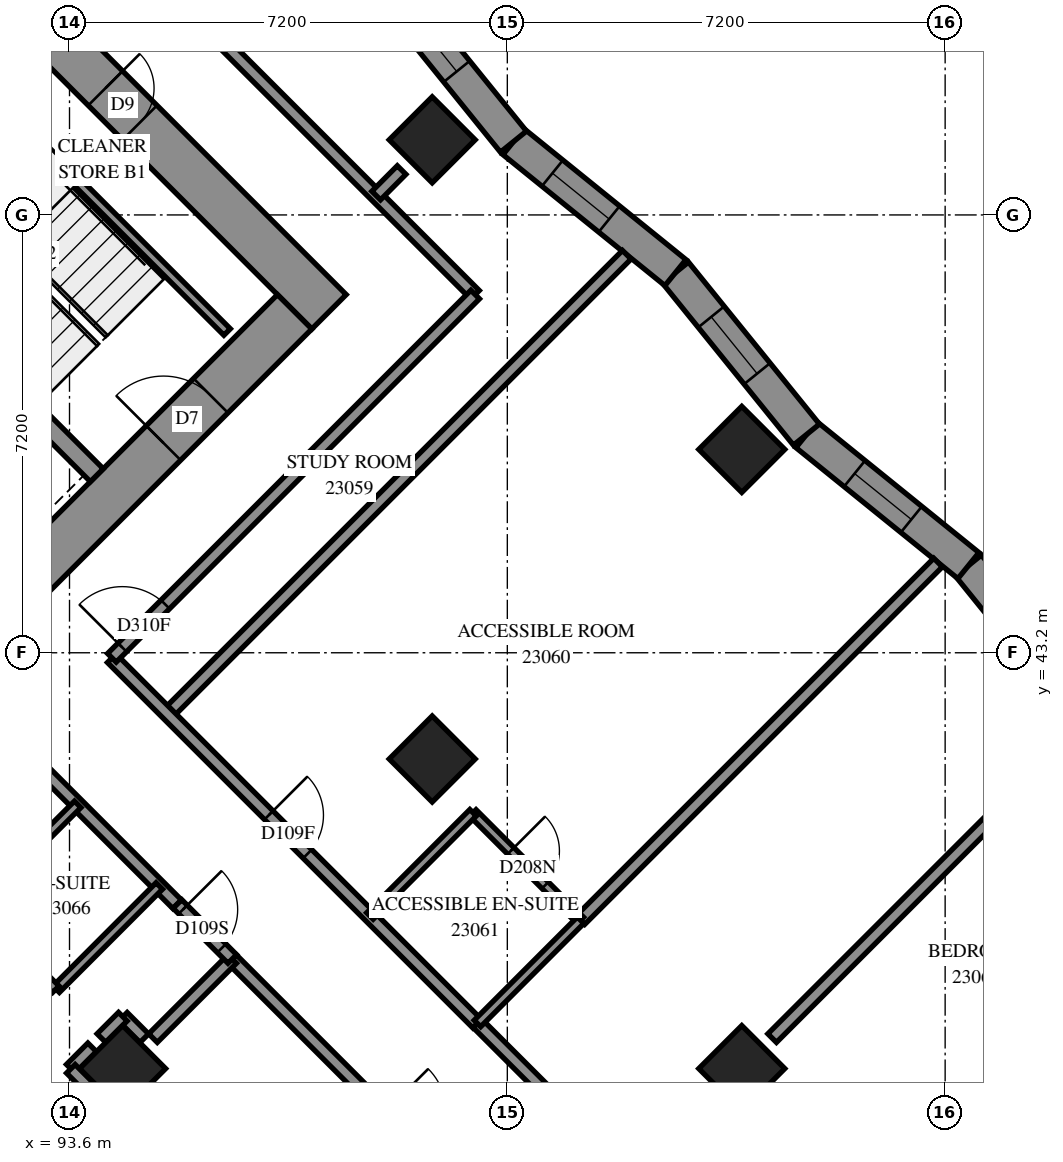
"""IFC4 building model, lengths in metres.
Left out: names, types, materials, properties, quantities, classifications, styles, units other than length and angle.
Written with IfcOpenShell. Run it as: python <this file> out.ifc"""

import sys

from ifc_helpers import new_model, si_unit, direction, frame, frame_2d, origin, origin_2d, place, context, subcontext, project, spatial, polyline, rectangle, outline, extrude, element, fill, save


model = new_model("IFC4")
c1 = context("Model", 3, precision=1e-05, world=origin(), true_north=direction((0.0, 1.0)))
c2 = subcontext(c1, "Body", "Model", "MODEL_VIEW")
j1 = project(units=[si_unit("LENGTHUNIT", "METRE"), si_unit("PLANEANGLEUNIT", "RADIAN")], contexts=[c1])
p1 = place(None, origin())
s1 = spatial("IfcSite", under=j1, at=p1, CompositionType="ELEMENT")
p2 = place(p1, origin())
s2 = spatial("IfcBuilding", under=s1, at=p2, CompositionType="ELEMENT")
p3 = place(p2, frame((0.0, 0.0, 88.0)))
s3 = spatial("IfcBuildingStorey", under=s2, at=p3, CompositionType="ELEMENT", Elevation=88.0)
for number, where, z_axis, x_axis in (
    (1, (99.565, 51.635, 0.0), (0.0, 0.0, 1.0), (0.707, -0.707, 0.0)),
    (2, (104.656, 46.544, 0.0), (0.0, 0.0, 1.0), (0.707, -0.707, 0.0)),
    (3, (99.565, 41.453, 0.0), (0.0, 0.0, 1.0), (0.707, -0.707, 0.0)),
    (4, (94.474, 36.362, 0.0), (0.0, 0.0, 1.0), (0.707, -0.707, 0.0)),
    (5, (104.656, 36.362, 0.0), (0.0, 0.0, 1.0), (0.707, -0.707, 0.0)),
):
    element("IfcColumn", number, at=place(p3, frame(where, z_axis=z_axis, x_axis=x_axis)), inside=s3, PredefinedType="COLUMN", context=c2, shape_type="SweptSolid", body=[
        extrude(rectangle(XDim=1.0, YDim=1.0, at=origin_2d()), origin(), (0.0, 0.0, 1.0), 3.1),
    ])
p4 = place(p3, frame((86.554, 60.121, -0.3), z_axis=(0.0, 0.0, 1.0), x_axis=(0.7071067812, -0.7071067812, 0.0)))
e6 = element("IfcWall", 6, at=p4, inside=s3, PredefinedType="SHEAR", context=c2, shape_type="SweptSolid", body=[
    extrude(rectangle(XDim=16.0, YDim=0.8, at=frame_2d((8.0, 0.0))), origin(), (0.0, 0.0, 1.0), 2.7),
])
p5 = place(p4, frame((10.8, 0.0, 0.3)))
e7 = element("IfcOpeningElement", 7, at=p5, cuts=e6, PredefinedType="OPENING", context=c2, shape_type="SweptSolid", body=[
    extrude(rectangle(XDim=0.8, YDim=2.1, at=frame_2d((0.4, 1.05))), frame((0.0, 0.41, 0.0), z_axis=(0.0, -1.0, 0.0), x_axis=(1.0, 0.0, 0.0)), (0.0, 0.0, 1.0), 0.82),
])
p6 = place(p3, frame((87.12, 38.625, -0.3), z_axis=(0.0, 0.0, 1.0), x_axis=(0.7071067812, 0.7071067812, 0.0)))
e8 = element("IfcWall", 8, at=p6, inside=s3, PredefinedType="SHEAR", context=c2, shape_type="SweptSolid", body=[
    extrude(rectangle(XDim=14.4, YDim=0.8, at=frame_2d((7.2, 0.0))), origin(), (0.0, 0.0, 1.0), 2.7),
])
p7 = place(p6, frame((4.55, 0.0, 0.3)))
e9 = element("IfcOpeningElement", 9, at=p7, cuts=e8, PredefinedType="OPENING", context=c2, shape_type="SweptSolid", body=[
    extrude(rectangle(XDim=1.1, YDim=2.1, at=frame_2d((0.55, 1.05))), frame((0.0, 0.41, 0.0), z_axis=(0.0, -1.0, 0.0), x_axis=(1.0, 0.0, 0.0)), (0.0, 0.0, 1.0), 0.82),
])
p8 = place(p6, frame((11.35, 0.0, 0.3)))
e10 = element("IfcOpeningElement", 10, at=p8, cuts=e8, PredefinedType="OPENING", context=c2, shape_type="SweptSolid", body=[
    extrude(rectangle(XDim=1.1, YDim=2.1, at=frame_2d((0.55, 1.05))), frame((0.0, 0.41, 0.0), z_axis=(0.0, -1.0, 0.0), x_axis=(1.0, 0.0, 0.0)), (0.0, 0.0, 1.0), 0.82),
])
p9 = place(p3, frame((88.958, 51.211, 0.0), z_axis=(0.0, 0.0, 1.0), x_axis=(0.7070998367, -0.7071137256, 0.0)))
e11 = element("IfcWall", 11, at=p9, inside=s3, PredefinedType="SOLIDWALL", context=c2, shape_type="SweptSolid", body=[
    extrude(rectangle(XDim=7.2, YDim=0.3, at=frame_2d((3.6, 0.0))), origin(), (0.0, 0.0, 1.0), 3.1),
])
p10 = place(p3, frame((110.552, 41.951, 0.0), z_axis=(0.0, 0.0, 1.0), x_axis=(-0.6286568792, 0.7776827941, 0.0)))
e12 = element("IfcWall", 12, at=p10, inside=s3, PredefinedType="SOLIDWALL", context=c2, shape_type="SweptSolid", body=[
    extrude(outline(polyline([(0.053, -0.275), (3.479, -0.275), (3.421, 0.275), (-0.053, 0.275), (0.053, -0.275)])), origin(), (0.0, 0.0, 1.0), 3.1),
])
p11 = place(p10, frame((1.11, 0.0, 0.5)))
e13 = element("IfcOpeningElement", 13, at=p11, cuts=e12, PredefinedType="OPENING", context=c2, shape_type="SweptSolid", body=[
    extrude(rectangle(XDim=1.2, YDim=2.45, at=frame_2d((0.6, 1.225))), frame((0.0, 0.285, 0.0), z_axis=(0.0, -1.0, 0.0), x_axis=(1.0, 0.0, 0.0)), (0.0, 0.0, 1.0), 0.57),
])
p12 = place(p3, frame((108.383, 44.634, 0.0), z_axis=(0.0, 0.0, 1.0), x_axis=(-0.777677697, 0.6286631845, 0.0)))
e14 = element("IfcWall", 14, at=p12, inside=s3, PredefinedType="SOLIDWALL", context=c2, shape_type="SweptSolid", body=[
    extrude(outline(polyline([(-0.029, -0.275), (3.397, -0.275), (3.455, 0.275), (0.029, 0.275), (-0.029, -0.275)])), origin(), (0.0, 0.0, 1.0), 3.1),
])
p13 = place(p12, frame((1.207, 0.0, 0.5)))
e15 = element("IfcOpeningElement", 15, at=p13, cuts=e14, PredefinedType="OPENING", context=c2, shape_type="SweptSolid", body=[
    extrude(rectangle(XDim=1.2, YDim=2.45, at=frame_2d((0.6, 1.225))), frame((0.0, 0.285, 0.0), z_axis=(0.0, -1.0, 0.0), x_axis=(1.0, 0.0, 0.0)), (0.0, 0.0, 1.0), 0.57),
])
p14 = place(p3, frame((105.719, 46.787, 0.0), z_axis=(0.0, 0.0, 1.0), x_axis=(-0.6286631845, 0.777677697, 0.0)))
e16 = element("IfcWall", 16, at=p14, inside=s3, PredefinedType="SOLIDWALL", context=c2, shape_type="SweptSolid", body=[
    extrude(outline(polyline([(0.029, -0.275), (3.455, -0.275), (3.397, 0.275), (-0.029, 0.275), (0.029, -0.275)])), origin(), (0.0, 0.0, 1.0), 3.1),
])
p15 = place(p14, frame((1.29, 0.0, 0.5)))
e17 = element("IfcOpeningElement", 17, at=p15, cuts=e16, PredefinedType="OPENING", context=c2, shape_type="SweptSolid", body=[
    extrude(rectangle(XDim=1.2, YDim=2.45, at=frame_2d((0.6, 1.225))), frame((0.0, 0.285, 0.0), z_axis=(0.0, -1.0, 0.0), x_axis=(1.0, 0.0, 0.0)), (0.0, 0.0, 1.0), 0.57),
])
p16 = place(p3, frame((103.565, 49.452, 0.0), z_axis=(0.0, 0.0, 1.0), x_axis=(-0.777689233, 0.6286489138, 0.0)))
e18 = element("IfcWall", 18, at=p16, inside=s3, PredefinedType="SOLIDWALL", context=c2, shape_type="SweptSolid", body=[
    extrude(outline(polyline([(-0.029, -0.275), (3.397, -0.275), (3.455, 0.275), (0.029, 0.275), (-0.029, -0.275)])), origin(), (0.0, 0.0, 1.0), 3.1),
])
p17 = place(p16, frame((1.401, 0.0, 0.5)))
e19 = element("IfcOpeningElement", 19, at=p17, cuts=e18, PredefinedType="OPENING", context=c2, shape_type="SweptSolid", body=[
    extrude(rectangle(XDim=1.2, YDim=2.45, at=frame_2d((0.6, 1.225))), frame((0.0, 0.285, 0.0), z_axis=(0.0, -1.0, 0.0), x_axis=(1.0, 0.0, 0.0)), (0.0, 0.0, 1.0), 0.57),
])
p18 = place(p3, frame((100.901, 51.605, 0.0), z_axis=(0.0, 0.0, 1.0), x_axis=(-0.6286631845, 0.777677697, 0.0)))
e20 = element("IfcWall", 20, at=p18, inside=s3, PredefinedType="SOLIDWALL", context=c2, shape_type="SweptSolid", body=[
    extrude(outline(polyline([(0.029, -0.275), (3.455, -0.275), (3.397, 0.275), (-0.029, 0.275), (0.029, -0.275)])), origin(), (0.0, 0.0, 1.0), 3.1),
])
p19 = place(p18, frame((1.484, 0.0, 0.5)))
e21 = element("IfcOpeningElement", 21, at=p19, cuts=e20, PredefinedType="OPENING", context=c2, shape_type="SweptSolid", body=[
    extrude(rectangle(XDim=1.2, YDim=2.45, at=frame_2d((0.6, 1.225))), frame((0.0, 0.285, 0.0), z_axis=(0.0, -1.0, 0.0), x_axis=(1.0, 0.0, 0.0)), (0.0, 0.0, 1.0), 0.57),
])
p20 = place(p3, frame((91.313, 53.354, 0.0), z_axis=(0.0, 0.0, 1.0), x_axis=(0.7071140275, -0.7070995348, 0.0)))
e22 = element("IfcWall", 22, at=p20, inside=s3, PredefinedType="PARTITIONING", context=c2, shape_type="SweptSolid", body=[
    extrude(rectangle(XDim=6.9, YDim=0.15, at=frame_2d((3.45, 0.0))), origin(), (0.0, 0.0, 1.0), 3.1),
])
p21 = place(p3, frame((87.894, 61.461, 0.0), z_axis=(0.0, 0.0, 1.0), x_axis=(0.7071067812, -0.7071067812, 0.0)))
e23 = element("IfcWall", 23, at=p21, inside=s3, PredefinedType="PARTITIONING", context=c2, shape_type="SweptSolid", body=[
    extrude(rectangle(XDim=17.5, YDim=0.2, at=frame_2d((8.75, 0.0))), origin(), (0.0, 0.0, 1.0), 3.1),
])
p22 = place(p21, frame((8.735, 0.0, 0.0)))
e24 = element("IfcOpeningElement", 24, at=p22, cuts=e23, PredefinedType="OPENING", context=c2, shape_type="SweptSolid", body=[
    extrude(rectangle(XDim=0.9, YDim=2.1, at=frame_2d((0.45, 1.05))), frame((0.0, 0.11, 0.0), z_axis=(0.0, -1.0, 0.0), x_axis=(1.0, 0.0, 0.0)), (0.0, 0.0, 1.0), 0.22),
])
p23 = place(p3, frame((95.215, 42.197, 0.0), z_axis=(0.0, 0.0, 1.0), x_axis=(0.7071067812, 0.7071067812, 0.0)))
e25 = element("IfcWall", 25, at=p23, inside=s3, PredefinedType="PARTITIONING", context=c2, shape_type="SweptSolid", body=[
    extrude(rectangle(XDim=10.675, YDim=0.2, at=frame_2d((5.338, 0.0))), origin(), (0.0, 0.0, 1.0), 3.1),
])
p24 = place(p3, frame((94.294, 43.111, 0.0), z_axis=(0.0, 0.0, 1.0), x_axis=(0.7071067812, -0.7071067812, 0.0)))
e26 = element("IfcWall", 26, at=p24, inside=s3, PredefinedType="PARTITIONING", context=c2, shape_type="SweptSolid", body=[
    extrude(rectangle(XDim=8.499, YDim=0.2, at=frame_2d((4.25, 0.0))), origin(), (0.0, 0.0, 1.0), 3.1),
])
p25 = place(p24, frame((3.651, 0.0, 0.0)))
e27 = element("IfcOpeningElement", 27, at=p25, cuts=e26, PredefinedType="OPENING", context=c2, shape_type="SweptSolid", body=[
    extrude(rectangle(XDim=0.9, YDim=2.1, at=frame_2d((0.45, 1.05))), frame((0.0, 0.11, 0.0), z_axis=(0.0, -1.0, 0.0), x_axis=(1.0, 0.0, 0.0)), (0.0, 0.0, 1.0), 0.22),
])
p26 = place(p3, frame((94.297, 43.117, 0.0), z_axis=(0.0, 0.0, 1.0), x_axis=(0.7071067812, 0.7071067812, 0.0)))
e28 = element("IfcWall", 28, at=p26, inside=s3, PredefinedType="PARTITIONING", context=c2, shape_type="SweptSolid", body=[
    extrude(rectangle(XDim=8.448, YDim=0.2, at=frame_2d((4.224, 0.0))), origin(), (0.0, 0.0, 1.0), 3.1),
])
p27 = place(p26, frame((0.242, 0.0, 0.0)))
e29 = element("IfcOpeningElement", 29, at=p27, cuts=e28, PredefinedType="OPENING", context=c2, shape_type="SweptSolid", body=[
    extrude(rectangle(XDim=1.0, YDim=2.1, at=frame_2d((0.5, 1.05))), frame((0.0, 0.11, 0.0), z_axis=(0.0, -1.0, 0.0), x_axis=(1.0, 0.0, 0.0)), (0.0, 0.0, 1.0), 0.22),
])
p28 = place(p3, frame((102.002, 38.804, 0.0), z_axis=(0.0, 0.0, 1.0), x_axis=(0.7072390372, 0.7069745004, 0.0)))
e30 = element("IfcWall", 30, at=p28, inside=s3, PredefinedType="PARTITIONING", context=c2, shape_type="SweptSolid", body=[
    extrude(rectangle(XDim=8.316, YDim=0.2, at=frame_2d((4.158, 0.0))), origin(), (0.0, 0.0, 1.0), 3.1),
])
p29 = place(p3, frame((105.155, 36.863, 0.0), z_axis=(0.0, 0.0, 1.0), x_axis=(0.7071067812, 0.7071067812, 0.0)))
e31 = element("IfcWall", 31, at=p29, inside=s3, PredefinedType="PARTITIONING", context=c2, shape_type="SweptSolid", body=[
    extrude(rectangle(XDim=5.787, YDim=0.2, at=frame_2d((2.893, 0.0))), origin(), (0.0, 0.0, 1.0), 3.1),
])
p30 = place(p3, frame((92.809, 41.627, 0.0), z_axis=(0.0, 0.0, 1.0), x_axis=(0.7071067812, -0.7071067812, 0.0)))
e32 = element("IfcWall", 32, at=p30, inside=s3, PredefinedType="PARTITIONING", context=c2, shape_type="SweptSolid", body=[
    extrude(rectangle(XDim=3.623, YDim=0.2, at=frame_2d((1.812, 0.0))), origin(), (0.0, 0.0, 1.0), 3.1),
])
p31 = place(p3, frame((100.31, 37.106, 0.0), z_axis=(0.0, 0.0, 1.0), x_axis=(0.7073845681, -0.7068288851, 0.0)))
e33 = element("IfcWall", 33, at=p31, inside=s3, PredefinedType="PARTITIONING", context=c2, shape_type="SweptSolid", body=[
    extrude(rectangle(XDim=3.599, YDim=0.2, at=frame_2d((1.8, 0.0))), origin(), (0.0, 0.0, 1.0), 3.1),
])
p32 = place(p3, frame((96.274, 38.162, 0.0), z_axis=(0.0, 0.0, 1.0), x_axis=(0.7071067812, -0.7071067812, 0.0)))
e34 = element("IfcWall", 34, at=p32, inside=s3, PredefinedType="PARTITIONING", context=c2, shape_type="SweptSolid", body=[
    extrude(rectangle(XDim=3.1, YDim=0.2, at=frame_2d((1.55, 0.0))), origin(), (0.0, 0.0, 1.0), 3.1),
])
p33 = place(p3, frame((100.233, 40.567, 0.0), z_axis=(0.0, 0.0, 1.0), x_axis=(0.7071067812, -0.7071067812, 0.0)))
e35 = element("IfcWall", 35, at=p33, inside=s3, PredefinedType="PARTITIONING", context=c2, shape_type="SweptSolid", body=[
    extrude(rectangle(XDim=2.5, YDim=0.15, at=frame_2d((1.25, 0.0))), origin(), (0.0, 0.0, 1.0), 3.1),
])
p34 = place(p33, frame((0.883, 0.0, 0.0)))
e36 = element("IfcOpeningElement", 36, at=p34, cuts=e35, PredefinedType="OPENING", context=c2, shape_type="SweptSolid", body=[
    extrude(rectangle(XDim=0.8, YDim=2.1, at=frame_2d((0.4, 1.05))), frame((0.0, 0.085, 0.0), z_axis=(0.0, -1.0, 0.0), x_axis=(1.0, 0.0, 0.0)), (0.0, 0.0, 1.0), 0.17),
])
for number, where, z_axis, x_axis in (
    (37, (92.037, 39.011, 0.0), (0.0, 0.0, 1.0), (0.708, 0.707, 0.0)),
    (38, (93.381, 37.667, 0.0), (0.0, 0.0, 1.0), (0.707, 0.708, 0.0)),
    (39, (98.541, 38.871, 0.0), (0.0, 0.0, 1.0), (0.707, 0.708, 0.0)),
    (40, (100.308, 37.103, 0.0), (0.0, 0.0, 1.0), (0.707, 0.708, 0.0)),
):
    element("IfcWall", number, at=place(p3, frame(where, z_axis=z_axis, x_axis=x_axis)), inside=s3, PredefinedType="PARTITIONING", context=c2, shape_type="SweptSolid", body=[
        extrude(rectangle(XDim=2.4, YDim=0.15, at=frame_2d((1.2, 0.0))), origin(), (0.0, 0.0, 1.0), 3.1),
    ])
p35 = place(p3, frame((92.031, 39.011, 0.0), z_axis=(0.0, 0.0, 1.0), x_axis=(0.7071067812, -0.7071067812, 0.0)))
e41 = element("IfcWall", 41, at=p35, inside=s3, PredefinedType="PARTITIONING", context=c2, shape_type="SweptSolid", body=[
    extrude(rectangle(XDim=1.901, YDim=0.15, at=frame_2d((0.95, 0.0))), origin(), (0.0, 0.0, 1.0), 3.1),
])
p36 = place(p35, frame((0.502, 0.0, 0.0)))
e42 = element("IfcOpeningElement", 42, at=p36, cuts=e41, PredefinedType="OPENING", context=c2, shape_type="SweptSolid", body=[
    extrude(rectangle(XDim=0.8, YDim=2.1, at=frame_2d((0.4, 1.05))), frame((0.0, 0.085, 0.0), z_axis=(0.0, -1.0, 0.0), x_axis=(1.0, 0.0, 0.0)), (0.0, 0.0, 1.0), 0.17),
])
p37 = place(p3, frame((94.973, 36.863, 0.0), z_axis=(0.0, 0.0, 1.0), x_axis=(0.7071067812, 0.7071067812, 0.0)))
e43 = element("IfcWall", 43, at=p37, inside=s3, PredefinedType="PARTITIONING", context=c2, shape_type="SweptSolid", body=[
    extrude(rectangle(XDim=1.841, YDim=0.2, at=frame_2d((0.921, 0.0))), origin(), (0.0, 0.0, 1.0), 3.1),
])
p38 = place(p3, frame((95.375, 39.069, 0.0), z_axis=(0.0, 0.0, 1.0), x_axis=(0.7063232841, -0.7078894111, 0.0)))
e44 = element("IfcWall", 44, at=p38, inside=s3, PredefinedType="PARTITIONING", context=c2, shape_type="SweptSolid", body=[
    extrude(rectangle(XDim=1.277, YDim=0.2, at=frame_2d((0.638, 0.0))), origin(), (0.0, 0.0, 1.0), 3.1),
])
p39 = place(p38, frame((0.129, 0.0, 0.0)))
e45 = element("IfcOpeningElement", 45, at=p39, cuts=e44, PredefinedType="OPENING", context=c2, shape_type="SweptSolid", body=[
    extrude(rectangle(XDim=0.9, YDim=2.1, at=frame_2d((0.45, 1.05))), frame((0.0, 0.11, 0.0), z_axis=(0.0, -1.0, 0.0), x_axis=(1.0, 0.0, 0.0)), (0.0, 0.0, 1.0), 0.22),
])
p40 = place(p3, frame((98.644, 50.718, 0.0), z_axis=(0.0, 0.0, 1.0), x_axis=(0.7054171665, 0.7087923682, 0.0)))
e46 = element("IfcWall", 46, at=p40, inside=s3, PredefinedType="PARTITIONING", context=c2, shape_type="SweptSolid", body=[
    extrude(rectangle(XDim=0.593, YDim=0.2, at=frame_2d((0.296, 0.0))), origin(), (0.0, 0.0, 1.0), 3.1),
])
for number, where, z_axis, x_axis in (
    (47, (93.621, 36.359, 0.0), (0.0, 0.0, 1.0), (0.707, 0.707, 0.0)),
    (48, (94.478, 37.214, 0.0), (0.0, 0.0, 1.0), (0.707, -0.707, 0.0)),
    (49, (94.125, 36.863, 0.0), (0.0, 0.0, 1.0), (0.707, 0.707, 0.0)),
    (50, (93.622, 36.358, 0.0), (0.0, 0.0, 1.0), (0.707, -0.707, 0.0)),
):
    element("IfcWall", number, at=place(p3, frame(where, z_axis=z_axis, x_axis=x_axis)), inside=s3, PredefinedType="PARTITIONING", context=c2, shape_type="SweptSolid", body=[
        extrude(rectangle(XDim=0.498, YDim=0.2, at=frame_2d((0.249, 0.0))), origin(), (0.0, 0.0, 1.0), 3.1),
    ])
p41 = place(p13, origin())
e51 = element("IfcWindow", 51, at=p41, inside=s3, PartitioningType="SINGLE_PANEL", PredefinedType="WINDOW", context=c2, shape_type="SweptSolid", body=[
    extrude(rectangle(XDim=1.2, YDim=2.45, at=frame_2d((0.6, 1.225))), frame((0.0, 0.155, 0.0), z_axis=(0.0, -1.0, 0.0), x_axis=(1.0, 0.0, 0.0)), (0.0, 0.0, 1.0), 0.06),
])
fill(e15, e51)
p42 = place(p15, origin())
e52 = element("IfcWindow", 52, at=p42, inside=s3, PartitioningType="SINGLE_PANEL", PredefinedType="WINDOW", context=c2, shape_type="SweptSolid", body=[
    extrude(rectangle(XDim=1.2, YDim=2.45, at=frame_2d((0.6, 1.225))), frame((0.0, 0.155, 0.0), z_axis=(0.0, -1.0, 0.0), x_axis=(1.0, 0.0, 0.0)), (0.0, 0.0, 1.0), 0.06),
])
fill(e17, e52)
p43 = place(p17, origin())
e53 = element("IfcWindow", 53, at=p43, inside=s3, PartitioningType="SINGLE_PANEL", PredefinedType="WINDOW", context=c2, shape_type="SweptSolid", body=[
    extrude(rectangle(XDim=1.2, YDim=2.45, at=frame_2d((0.6, 1.225))), frame((0.0, 0.155, 0.0), z_axis=(0.0, -1.0, 0.0), x_axis=(1.0, 0.0, 0.0)), (0.0, 0.0, 1.0), 0.06),
])
fill(e19, e53)
p44 = place(p19, origin())
e54 = element("IfcWindow", 54, at=p44, inside=s3, PartitioningType="SINGLE_PANEL", PredefinedType="WINDOW", context=c2, shape_type="SweptSolid", body=[
    extrude(rectangle(XDim=1.2, YDim=2.45, at=frame_2d((0.6, 1.225))), frame((0.0, 0.155, 0.0), z_axis=(0.0, -1.0, 0.0), x_axis=(1.0, 0.0, 0.0)), (0.0, 0.0, 1.0), 0.06),
])
fill(e21, e54)
p45 = place(p5, origin())
e55 = element("IfcDoor", 55, at=p45, inside=s3, OperationType="SINGLE_SWING_RIGHT", PredefinedType="DOOR", context=c2, shape_type="SweptSolid", body=[
    extrude(rectangle(XDim=0.8, YDim=2.1, at=frame_2d((0.4, 1.05))), frame((0.0, -0.34, 0.0), z_axis=(0.0, -1.0, 0.0), x_axis=(1.0, 0.0, 0.0)), (0.0, 0.0, 1.0), 0.05),
])
fill(e7, e55)
p46 = place(p8, origin())
e56 = element("IfcDoor", 56, at=p46, inside=s3, OperationType="SINGLE_SWING_RIGHT", PredefinedType="DOOR", context=c2, shape_type="SweptSolid", body=[
    extrude(rectangle(XDim=1.1, YDim=2.1, at=frame_2d((0.55, 1.05))), frame((0.0, 0.025, 0.0), z_axis=(0.0, -1.0, 0.0), x_axis=(1.0, 0.0, 0.0)), (0.0, 0.0, 1.0), 0.05),
])
fill(e10, e56)
p47 = place(p27, origin())
e57 = element("IfcDoor", 57, at=p47, inside=s3, OperationType="SINGLE_SWING_LEFT", PredefinedType="DOOR", context=c2, shape_type="SweptSolid", body=[
    extrude(rectangle(XDim=1.0, YDim=2.1, at=frame_2d((0.5, 1.05))), frame((0.0, 0.025, 0.0), z_axis=(0.0, -1.0, 0.0), x_axis=(1.0, 0.0, 0.0)), (0.0, 0.0, 1.0), 0.05),
])
fill(e29, e57)
p48 = place(p25, origin())
e58 = element("IfcDoor", 58, at=p48, inside=s3, OperationType="SINGLE_SWING_RIGHT", PredefinedType="DOOR", context=c2, shape_type="SweptSolid", body=[
    extrude(rectangle(XDim=0.9, YDim=2.1, at=frame_2d((0.45, 1.05))), frame((0.0, 0.025, 0.0), z_axis=(0.0, -1.0, 0.0), x_axis=(1.0, 0.0, 0.0)), (0.0, 0.0, 1.0), 0.05),
])
fill(e27, e58)
p49 = place(p34, origin())
e59 = element("IfcDoor", 59, at=p49, inside=s3, OperationType="SINGLE_SWING_RIGHT", PredefinedType="DOOR", context=c2, shape_type="SweptSolid", body=[
    extrude(rectangle(XDim=0.8, YDim=2.1, at=frame_2d((0.4, 1.05))), frame((0.0, 0.025, 0.0), z_axis=(0.0, -1.0, 0.0), x_axis=(1.0, 0.0, 0.0)), (0.0, 0.0, 1.0), 0.05),
])
fill(e36, e59)
p50 = place(p39, origin())
e60 = element("IfcDoor", 60, at=p50, inside=s3, OperationType="SINGLE_SWING_LEFT", PredefinedType="DOOR", context=c2, shape_type="SweptSolid", body=[
    extrude(rectangle(XDim=0.9, YDim=2.1, at=frame_2d((0.45, 1.05))), frame((0.0, 0.025, 0.0), z_axis=(0.0, -1.0, 0.0), x_axis=(1.0, 0.0, 0.0)), (0.0, 0.0, 1.0), 0.05),
])
fill(e45, e60)
save(model, sys.argv[1])
